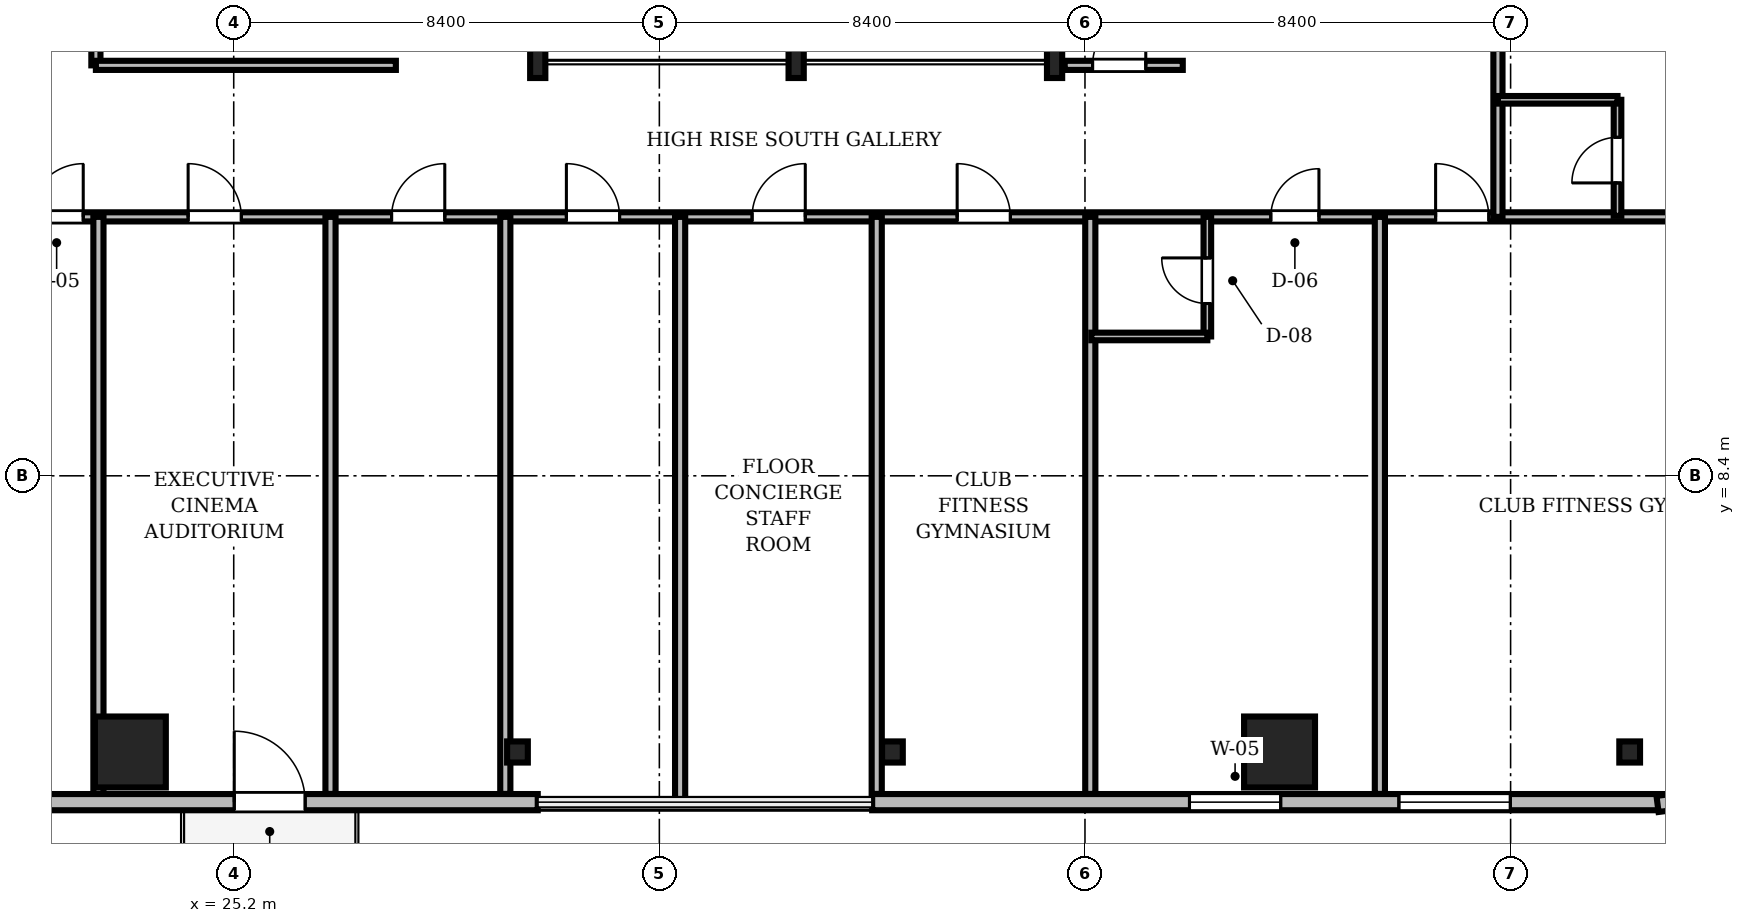
"""IFC4 building model, lengths in metres.
Left out: names, types, materials, properties, quantities, classifications, styles, units other than length and angle.
Written with IfcOpenShell. Run it as: python <this file> out.ifc"""

import sys

from ifc_helpers import new_model, si_unit, direction, frame, frame_2d, origin, origin_2d, place, context, subcontext, project, spatial, rectangle, i_section, extrude, source, transform, mapped, element, fill, save


model = new_model("IFC4")
c1 = context("Model", 3, precision=1e-05, world=origin(), true_north=direction((0.0, 1.0)))
c2 = subcontext(c1, "Body", "Model", "MODEL_VIEW")
j1 = project(units=[si_unit("LENGTHUNIT", "METRE"), si_unit("PLANEANGLEUNIT", "RADIAN")], contexts=[c1])
p1 = place(None, origin())
s1 = spatial("IfcSite", under=j1, at=p1, CompositionType="ELEMENT")
p2 = place(p1, origin())
s2 = spatial("IfcBuilding", under=s1, at=p2, CompositionType="ELEMENT")
p3 = place(p2, frame((0.0, 0.0, 184.8)))
s3 = spatial("IfcBuildingStorey", under=s2, at=p3, CompositionType="ELEMENT", Elevation=184.8)
m1 = source(origin(), c2, "Body", "SweptSolid", [
    extrude(i_section(OverallWidth=0.3, OverallDepth=0.7, WebThickness=0.017, FlangeThickness=0.032, FilletRadius=0.027, at=origin_2d()), origin(), (0.0, 0.0, 1.0), 3.53),
])
for number, where, z_axis, x_axis in (
    (1, (31.2, 16.6, 0.0), (0.0, 0.0, 1.0), (1.0, 0.0, 0.0)),
    (2, (36.3, 16.6, 0.0), (0.0, 0.0, 1.0), (1.0, 0.0, 0.0)),
    (3, (41.4, 16.6, 0.0), (0.0, 0.0, 1.0), (1.0, 0.0, 0.0)),
):
    element("IfcColumn", number, at=place(p3, frame(where, z_axis=z_axis, x_axis=x_axis)), inside=s3, PredefinedType="COLUMN", context=c2, shape_type="MappedRepresentation", body=[
        mapped(m1, transform((0.0, 0.0, 0.0), scale=1.0)),
    ])
m2 = source(origin(), c2, "Body", "SweptSolid", [
    extrude(rectangle(XDim=1.4, YDim=1.4, at=origin_2d()), origin(), (0.0, 0.0, 1.0), 3.53),
])
for number, where, z_axis, x_axis in (
    (4, (23.16, 2.95, 0.0), (0.0, 0.0, 1.0), (1.0, 0.0, 0.0)),
    (5, (45.84, 2.95, 0.0), (0.0, 0.0, 1.0), (1.0, 0.0, 0.0)),
):
    element("IfcColumn", number, at=place(p3, frame(where, z_axis=z_axis, x_axis=x_axis)), inside=s3, PredefinedType="COLUMN", context=c2, shape_type="MappedRepresentation", body=[
        mapped(m2, transform((0.0, 0.0, 0.0), scale=1.0)),
    ])
m3 = source(origin(), c2, "Body", "SweptSolid", [
    extrude(i_section(OverallWidth=0.409, OverallDepth=0.417, WebThickness=0.021, FlangeThickness=0.033, FilletRadius=0.015, at=origin_2d()), origin(), (0.0, 0.0, 1.0), 3.53),
])
for number, where, z_axis, x_axis in (
    (6, (30.8, 2.95, 0.0), (0.0, 0.0, 1.0), (1.0, 0.0, 0.0)),
    (7, (38.2, 2.95, 0.0), (0.0, 0.0, 1.0), (1.0, 0.0, 0.0)),
    (8, (52.75, 2.95, 0.0), (0.0, 0.0, 1.0), (1.0, 0.0, 0.0)),
):
    element("IfcColumn", number, at=place(p3, frame(where, z_axis=z_axis, x_axis=x_axis)), inside=s3, PredefinedType="COLUMN", context=c2, shape_type="MappedRepresentation", body=[
        mapped(m3, transform((0.0, 0.0, 0.0), scale=1.0)),
    ])
m4 = source(origin(), c2, "Body", "SweptSolid", [
    extrude(rectangle(XDim=15.6, YDim=0.32, at=frame_2d((7.8, 0.0))), origin(), (0.0, 0.0, 1.0), 3.53),
])
p4 = place(p3, frame((15.6, 1.96, 0.0), z_axis=(0.0, 0.0, 1.0), x_axis=(1.0, 0.0, 0.0)))
e9 = element("IfcWall", 9, at=p4, inside=s3, PredefinedType="SOLIDWALL", context=c2, shape_type="MappedRepresentation", body=[
    mapped(m4, transform((0.0, 0.0, 0.0), scale=1.0)),
])
m5 = source(origin(), c2, "Body", "SweptSolid", [
    extrude(rectangle(XDim=1.4, YDim=2.3, at=frame_2d((0.7, 1.15))), frame((0.0, 0.17, 0.0), z_axis=(0.0, -1.0, 0.0), x_axis=(1.0, 0.0, 0.0)), (0.0, 0.0, 1.0), 0.34),
])
p5 = place(p4, frame((9.61, 0.0, 0.0)))
e10 = element("IfcOpeningElement", 10, at=p5, cuts=e9, PredefinedType="OPENING", context=c2, shape_type="MappedRepresentation", body=[
    mapped(m5, transform((0.0, 0.0, 0.0), scale=1.0)),
])
m6 = source(origin(), c2, "Body", "SweptSolid", [
    extrude(rectangle(XDim=2.2, YDim=2.4, at=frame_2d((1.1, 1.2))), frame((0.0, 0.17, 0.0), z_axis=(0.0, -1.0, 0.0), x_axis=(1.0, 0.0, 0.0)), (0.0, 0.0, 1.0), 0.34),
])
p6 = place(p4, frame((3.005, 0.0, 0.72)))
e11 = element("IfcOpeningElement", 11, at=p6, cuts=e9, PredefinedType="OPENING", context=c2, shape_type="MappedRepresentation", body=[
    mapped(m6, transform((0.0, 0.0, 0.0), scale=1.0)),
])
p7 = place(p3, frame((37.8, 1.96, 0.0), z_axis=(0.0, 0.0, 1.0), x_axis=(1.0, 0.0, 0.0)))
e12 = element("IfcWall", 12, at=p7, inside=s3, PredefinedType="SOLIDWALL", context=c2, shape_type="MappedRepresentation", body=[
    mapped(m4, transform((0.0, 0.0, 0.0), scale=1.0)),
])
p8 = place(p7, frame((10.395, 0.0, 0.72)))
e13 = element("IfcOpeningElement", 13, at=p8, cuts=e12, PredefinedType="OPENING", context=c2, shape_type="MappedRepresentation", body=[
    mapped(m6, transform((0.0, 0.0, 0.0), scale=1.0)),
])
m7 = source(origin(), c2, "Body", "SweptSolid", [
    extrude(rectangle(XDim=1.8, YDim=2.4, at=frame_2d((0.9, 1.2))), frame((0.0, 0.17, 0.0), z_axis=(0.0, -1.0, 0.0), x_axis=(1.0, 0.0, 0.0)), (0.0, 0.0, 1.0), 0.34),
])
p9 = place(p7, frame((6.262, 0.0, 0.72)))
e14 = element("IfcOpeningElement", 14, at=p9, cuts=e12, PredefinedType="OPENING", context=c2, shape_type="MappedRepresentation", body=[
    mapped(m7, transform((0.0, 0.0, 0.0), scale=1.0)),
])
m8 = source(origin(), c2, "Body", "SweptSolid", [
    extrude(rectangle(XDim=1.17, YDim=0.32, at=frame_2d((0.585, 0.0))), origin(), (0.0, 0.0, 1.0), 3.53),
])
p10 = place(p3, frame((53.3, 1.925, 0.0), z_axis=(0.0, 0.0, 1.0), x_axis=(0.991762485493, 0.128090485085, 0.0)))
e15 = element("IfcWall", 15, at=p10, inside=s3, PredefinedType="SOLIDWALL", context=c2, shape_type="MappedRepresentation", body=[
    mapped(m8, transform((0.0, 0.0, 0.0), scale=1.0)),
])
m9 = source(origin(), c2, "Body", "SweptSolid", [
    extrude(rectangle(XDim=46.156, YDim=0.18, at=frame_2d((23.078, 0.0))), origin(), (0.0, 0.0, 1.0), 2.772),
])
p11 = place(p3, frame((11.422, 13.51, 0.0), z_axis=(0.0, 0.0, 1.0), x_axis=(1.0, 0.0, 0.0)))
e16 = element("IfcWall", 16, at=p11, inside=s3, PredefinedType="PARTITIONING", context=c2, shape_type="MappedRepresentation", body=[
    mapped(m9, transform((0.0, 0.0, 0.0), scale=1.0)),
])
m10 = source(origin(), c2, "Body", "SweptSolid", [
    extrude(rectangle(XDim=1.05, YDim=2.2, at=frame_2d((0.525, 1.1))), frame((0.0, 0.1, 0.0), z_axis=(0.0, -1.0, 0.0), x_axis=(1.0, 0.0, 0.0)), (0.0, 0.0, 1.0), 0.2),
])
p12 = place(p11, frame((9.758, 0.0, 0.0)))
e17 = element("IfcOpeningElement", 17, at=p12, cuts=e16, PredefinedType="OPENING", context=c2, shape_type="MappedRepresentation", body=[
    mapped(m10, transform((0.0, 0.0, 0.0), scale=1.0)),
])
p13 = place(p11, frame((12.878, 0.0, 0.0)))
e18 = element("IfcOpeningElement", 18, at=p13, cuts=e16, PredefinedType="OPENING", context=c2, shape_type="MappedRepresentation", body=[
    mapped(m10, transform((0.0, 0.0, 0.0), scale=1.0)),
])
p14 = place(p11, frame((16.893, 0.0, 0.0)))
e19 = element("IfcOpeningElement", 19, at=p14, cuts=e16, PredefinedType="OPENING", context=c2, shape_type="MappedRepresentation", body=[
    mapped(m10, transform((0.0, 0.0, 0.0), scale=1.0)),
])
p15 = place(p11, frame((20.344, 0.0, 0.0)))
e20 = element("IfcOpeningElement", 20, at=p15, cuts=e16, PredefinedType="OPENING", context=c2, shape_type="MappedRepresentation", body=[
    mapped(m10, transform((0.0, 0.0, 0.0), scale=1.0)),
])
p16 = place(p11, frame((24.008, 0.0, 0.0)))
e21 = element("IfcOpeningElement", 21, at=p16, cuts=e16, PredefinedType="OPENING", context=c2, shape_type="MappedRepresentation", body=[
    mapped(m10, transform((0.0, 0.0, 0.0), scale=1.0)),
])
p17 = place(p11, frame((28.055, 0.0, 0.0)))
e22 = element("IfcOpeningElement", 22, at=p17, cuts=e16, PredefinedType="OPENING", context=c2, shape_type="MappedRepresentation", body=[
    mapped(m10, transform((0.0, 0.0, 0.0), scale=1.0)),
])
m11 = source(origin(), c2, "Body", "SweptSolid", [
    extrude(rectangle(XDim=0.95, YDim=2.15, at=frame_2d((0.475, 1.075))), frame((0.0, 0.1, 0.0), z_axis=(0.0, -1.0, 0.0), x_axis=(1.0, 0.0, 0.0)), (0.0, 0.0, 1.0), 0.2),
])
p18 = place(p11, frame((34.246, 0.0, 0.0)))
e23 = element("IfcOpeningElement", 23, at=p18, cuts=e16, PredefinedType="OPENING", context=c2, shape_type="MappedRepresentation", body=[
    mapped(m11, transform((0.0, 0.0, 0.0), scale=1.0)),
])
p19 = place(p11, frame((37.498, 0.0, 0.0)))
e24 = element("IfcOpeningElement", 24, at=p19, cuts=e16, PredefinedType="OPENING", context=c2, shape_type="MappedRepresentation", body=[
    mapped(m10, transform((0.0, 0.0, 0.0), scale=1.0)),
])
m12 = source(origin(), c2, "Body", "SweptSolid", [
    extrude(rectangle(XDim=27.59, YDim=0.18, at=frame_2d((13.795, 0.0))), origin(), (0.0, 0.0, 1.0), 2.972),
])
p20 = place(p3, frame((50.15, 13.51, 0.0), z_axis=(0.0, 0.0, 1.0), x_axis=(0.0, 1.0, 0.0)))
e25 = element("IfcWall", 25, at=p20, inside=s3, PredefinedType="PARTITIONING", context=c2, shape_type="MappedRepresentation", body=[
    mapped(m12, transform((0.0, 0.0, 0.0), scale=1.0)),
])
p21 = place(p20, frame((4.086, 0.0, 0.0)))
e26 = element("IfcOpeningElement", 26, at=p21, cuts=e25, PredefinedType="OPENING", context=c2, shape_type="MappedRepresentation", body=[
    mapped(m10, transform((0.0, 0.0, 0.0), scale=1.0)),
])
p22 = place(p20, frame((9.744, 0.0, 0.0)))
e27 = element("IfcOpeningElement", 27, at=p22, cuts=e25, PredefinedType="OPENING", context=c2, shape_type="MappedRepresentation", body=[
    mapped(m10, transform((0.0, 0.0, 0.0), scale=1.0)),
])
p23 = place(p20, frame((17.771, 0.0, 0.0)))
e28 = element("IfcOpeningElement", 28, at=p23, cuts=e25, PredefinedType="OPENING", context=c2, shape_type="MappedRepresentation", body=[
    mapped(m10, transform((0.0, 0.0, 0.0), scale=1.0)),
])
p24 = place(p20, frame((24.614, 0.0, 0.0)))
e29 = element("IfcOpeningElement", 29, at=p24, cuts=e25, PredefinedType="OPENING", context=c2, shape_type="MappedRepresentation", body=[
    mapped(m10, transform((0.0, 0.0, 0.0), scale=1.0)),
])
m13 = source(origin(), c2, "Body", "SweptSolid", [
    extrude(rectangle(XDim=3.55, YDim=0.18, at=frame_2d((1.775, 0.0))), origin(), (0.0, 0.0, 1.0), 2.972),
])
p25 = place(p3, frame((22.48, 16.5, 0.0), z_axis=(0.0, 0.0, 1.0), x_axis=(0.0, 1.0, 0.0)))
e30 = element("IfcWall", 30, at=p25, inside=s3, PredefinedType="PARTITIONING", context=c2, shape_type="MappedRepresentation", body=[
    mapped(m13, transform((0.0, 0.0, 0.0), scale=1.0)),
])
p26 = place(p25, frame((1.15, 0.0, 0.0)))
e31 = element("IfcOpeningElement", 31, at=p26, cuts=e30, PredefinedType="OPENING", context=c2, shape_type="MappedRepresentation", body=[
    mapped(m10, transform((0.0, 0.0, 0.0), scale=1.0)),
])
m14 = source(origin(), c2, "Body", "SweptSolid", [
    extrude(rectangle(XDim=2.36, YDim=0.15, at=frame_2d((1.18, 0.0))), origin(), (0.0, 0.0, 1.0), 3.192),
])
p27 = place(p3, frame((44.415, 11.15, 0.0), z_axis=(0.0, 0.0, 1.0), x_axis=(0.0, 1.0, 0.0)))
e32 = element("IfcWall", 32, at=p27, inside=s3, PredefinedType="PARTITIONING", context=c2, shape_type="MappedRepresentation", body=[
    mapped(m14, transform((0.0, 0.0, 0.0), scale=1.0)),
])
m15 = source(origin(), c2, "Body", "SweptSolid", [
    extrude(rectangle(XDim=0.9, YDim=2.1, at=frame_2d((0.45, 1.05))), frame((0.0, 0.085, 0.0), z_axis=(0.0, -1.0, 0.0), x_axis=(1.0, 0.0, 0.0)), (0.0, 0.0, 1.0), 0.17),
])
p28 = place(p27, frame((0.65, 0.0, 0.0)))
e33 = element("IfcOpeningElement", 33, at=p28, cuts=e32, PredefinedType="OPENING", context=c2, shape_type="MappedRepresentation", body=[
    mapped(m15, transform((0.0, 0.0, 0.0), scale=1.0)),
])
m16 = source(origin(), c2, "Body", "SweptSolid", [
    extrude(rectangle(XDim=2.33, YDim=0.18, at=frame_2d((1.165, 0.0))), origin(), (0.0, 0.0, 1.0), 2.972),
])
p29 = place(p3, frame((41.6, 16.5, 0.0), z_axis=(0.0, 0.0, 1.0), x_axis=(1.0, 0.0, 0.0)))
e34 = element("IfcWall", 34, at=p29, inside=s3, PredefinedType="PARTITIONING", context=c2, shape_type="MappedRepresentation", body=[
    mapped(m16, transform((0.0, 0.0, 0.0), scale=1.0)),
])
p30 = place(p29, frame((0.55, 0.0, 0.0)))
e35 = element("IfcOpeningElement", 35, at=p30, cuts=e34, PredefinedType="OPENING", context=c2, shape_type="MappedRepresentation", body=[
    mapped(m10, transform((0.0, 0.0, 0.0), scale=1.0)),
])
m17 = source(origin(), c2, "Body", "SweptSolid", [
    extrude(rectangle(XDim=2.29, YDim=0.15, at=frame_2d((1.145, 0.0))), origin(), (0.0, 0.0, 1.0), 2.972),
])
p31 = place(p3, frame((52.51, 13.53, 0.0), z_axis=(0.0, 0.0, 1.0), x_axis=(0.0, 1.0, 0.0)))
e36 = element("IfcWall", 36, at=p31, inside=s3, PredefinedType="PARTITIONING", context=c2, shape_type="MappedRepresentation", body=[
    mapped(m17, transform((0.0, 0.0, 0.0), scale=1.0)),
])
p32 = place(p31, frame((0.65, 0.0, 0.0)))
e37 = element("IfcOpeningElement", 37, at=p32, cuts=e36, PredefinedType="OPENING", context=c2, shape_type="MappedRepresentation", body=[
    mapped(m15, transform((0.0, 0.0, 0.0), scale=1.0)),
])
m18 = source(origin(), c2, "Body", "SweptSolid", [
    extrude(rectangle(XDim=11.388, YDim=0.2, at=frame_2d((5.694, 0.0))), origin(), (0.0, 0.0, 1.0), 2.772),
])
for number, where, z_axis, x_axis in (
    (38, (22.53, 2.122, 0.0), (0.0, 0.0, 1.0), (0.0, 1.0, 0.0)),
    (39, (27.11, 2.122, 0.0), (0.0, 0.0, 1.0), (0.0, 1.0, 0.0)),
    (40, (30.56, 2.122, 0.0), (0.0, 0.0, 1.0), (0.0, 1.0, 0.0)),
):
    element("IfcWall", number, at=place(p3, frame(where, z_axis=z_axis, x_axis=x_axis)), inside=s3, PredefinedType="PARTITIONING", context=c2, shape_type="MappedRepresentation", body=[
        mapped(m18, transform((0.0, 0.0, 0.0), scale=1.0)),
    ])
m19 = source(origin(), c2, "Body", "SweptSolid", [
    extrude(rectangle(XDim=11.58, YDim=0.2, at=frame_2d((5.79, 0.0))), origin(), (0.0, 0.0, 1.0), 2.772),
])
p33 = place(p3, frame((34.01, 1.93, 0.0), z_axis=(0.0, 0.0, 1.0), x_axis=(0.0, 1.0, 0.0)))
e41 = element("IfcWall", 41, at=p33, inside=s3, PredefinedType="PARTITIONING", context=c2, shape_type="MappedRepresentation", body=[
    mapped(m19, transform((0.0, 0.0, 0.0), scale=1.0)),
])
for number, where, z_axis, x_axis in (
    (42, (37.89, 2.122, 0.0), (0.0, 0.0, 1.0), (0.0, 1.0, 0.0)),
    (43, (42.105, 2.122, 0.0), (0.0, 0.0, 1.0), (0.0, 1.0, 0.0)),
    (44, (47.82, 2.122, 0.0), (0.0, 0.0, 1.0), (0.0, 1.0, 0.0)),
):
    element("IfcWall", number, at=place(p3, frame(where, z_axis=z_axis, x_axis=x_axis)), inside=s3, PredefinedType="PARTITIONING", context=c2, shape_type="MappedRepresentation", body=[
        mapped(m18, transform((0.0, 0.0, 0.0), scale=1.0)),
    ])
m20 = source(origin(), c2, "Body", "SweptSolid", [
    extrude(rectangle(XDim=5.92, YDim=0.18, at=frame_2d((2.96, 0.0))), origin(), (0.0, 0.0, 1.0), 3.53),
])
p34 = place(p3, frame((22.48, 16.5, 0.0), z_axis=(0.0, 0.0, 1.0), x_axis=(1.0, 0.0, 0.0)))
e45 = element("IfcWall", 45, at=p34, inside=s3, PredefinedType="PARTITIONING", context=c2, shape_type="MappedRepresentation", body=[
    mapped(m20, transform((0.0, 0.0, 0.0), scale=1.0)),
])
m21 = source(origin(), c2, "Body", "SweptSolid", [
    extrude(rectangle(XDim=2.36, YDim=0.15, at=frame_2d((1.18, 0.0))), origin(), (0.0, 0.0, 1.0), 3.53),
])
p35 = place(p3, frame((50.15, 15.82, 0.0), z_axis=(0.0, 0.0, 1.0), x_axis=(1.0, 0.0, 0.0)))
e46 = element("IfcWall", 46, at=p35, inside=s3, PredefinedType="PARTITIONING", context=c2, shape_type="MappedRepresentation", body=[
    mapped(m21, transform((0.0, 0.0, 0.0), scale=1.0)),
])
p36 = place(p3, frame((42.125, 11.15, 0.0), z_axis=(0.0, 0.0, 1.0), x_axis=(1.0, 0.0, 0.0)))
e47 = element("IfcWall", 47, at=p36, inside=s3, PredefinedType="PARTITIONING", context=c2, shape_type="MappedRepresentation", body=[
    mapped(m17, transform((0.0, 0.0, 0.0), scale=1.0)),
])
m22 = source(origin(), c2, "Body", "SweptSolid", [
    extrude(rectangle(XDim=1.4, YDim=2.3, at=frame_2d((0.7, 1.15))), frame((0.0, 0.025, 0.0), z_axis=(0.0, -1.0, 0.0), x_axis=(1.0, 0.0, 0.0)), (0.0, 0.0, 1.0), 0.05),
])
p37 = place(p5, frame((1.4, 0.0, 0.0), z_axis=(0.0, 0.0, 1.0), x_axis=(-1.0, 0.0, 0.0)))
e48 = element("IfcDoor", 48, at=p37, inside=s3, OperationType="DOUBLE_DOOR_SLIDING", PredefinedType="DOOR", context=c2, shape_type="MappedRepresentation", body=[
    mapped(m22, transform((0.0, 0.0, 0.0), scale=1.0)),
])
fill(e10, e48)
m23 = source(origin(), c2, "Body", "SweptSolid", [
    extrude(rectangle(XDim=2.2, YDim=2.4, at=frame_2d((1.1, 1.2))), frame((0.0, 0.03, 0.0), z_axis=(0.0, -1.0, 0.0), x_axis=(1.0, 0.0, 0.0)), (0.0, 0.0, 1.0), 0.06),
])
p38 = place(p8, origin())
e49 = element("IfcWindow", 49, at=p38, inside=s3, PartitioningType="SINGLE_PANEL", PredefinedType="WINDOW", context=c2, shape_type="MappedRepresentation", body=[
    mapped(m23, transform((0.0, 0.0, 0.0), scale=1.0)),
])
fill(e13, e49)
m24 = source(origin(), c2, "Body", "SweptSolid", [
    extrude(rectangle(XDim=1.8, YDim=2.4, at=frame_2d((0.9, 1.2))), frame((0.0, 0.03, 0.0), z_axis=(0.0, -1.0, 0.0), x_axis=(1.0, 0.0, 0.0)), (0.0, 0.0, 1.0), 0.06),
])
p39 = place(p9, origin())
e50 = element("IfcWindow", 50, at=p39, inside=s3, PartitioningType="SINGLE_PANEL", PredefinedType="WINDOW", context=c2, shape_type="MappedRepresentation", body=[
    mapped(m24, transform((0.0, 0.0, 0.0), scale=1.0)),
])
fill(e14, e50)
m25 = source(origin(), c2, "Body", "SweptSolid", [
    extrude(rectangle(XDim=1.05, YDim=2.2, at=frame_2d((0.525, 1.1))), frame((0.0, 0.025, 0.0), z_axis=(0.0, -1.0, 0.0), x_axis=(1.0, 0.0, 0.0)), (0.0, 0.0, 1.0), 0.05),
])
p40 = place(p12, origin())
e51 = element("IfcDoor", 51, at=p40, inside=s3, OperationType="SINGLE_SWING_RIGHT", PredefinedType="DOOR", context=c2, shape_type="MappedRepresentation", body=[
    mapped(m25, transform((0.0, 0.0, 0.0), scale=1.0)),
])
fill(e17, e51)
p41 = place(p13, origin())
e52 = element("IfcDoor", 52, at=p41, inside=s3, OperationType="SINGLE_SWING_LEFT", PredefinedType="DOOR", context=c2, shape_type="MappedRepresentation", body=[
    mapped(m25, transform((0.0, 0.0, 0.0), scale=1.0)),
])
fill(e18, e52)
p42 = place(p14, origin())
e53 = element("IfcDoor", 53, at=p42, inside=s3, OperationType="SINGLE_SWING_RIGHT", PredefinedType="DOOR", context=c2, shape_type="MappedRepresentation", body=[
    mapped(m25, transform((0.0, 0.0, 0.0), scale=1.0)),
])
fill(e19, e53)
p43 = place(p15, origin())
e54 = element("IfcDoor", 54, at=p43, inside=s3, OperationType="SINGLE_SWING_LEFT", PredefinedType="DOOR", context=c2, shape_type="MappedRepresentation", body=[
    mapped(m25, transform((0.0, 0.0, 0.0), scale=1.0)),
])
fill(e20, e54)
p44 = place(p16, origin())
e55 = element("IfcDoor", 55, at=p44, inside=s3, OperationType="SINGLE_SWING_RIGHT", PredefinedType="DOOR", context=c2, shape_type="MappedRepresentation", body=[
    mapped(m25, transform((0.0, 0.0, 0.0), scale=1.0)),
])
fill(e21, e55)
p45 = place(p17, origin())
e56 = element("IfcDoor", 56, at=p45, inside=s3, OperationType="SINGLE_SWING_LEFT", PredefinedType="DOOR", context=c2, shape_type="MappedRepresentation", body=[
    mapped(m25, transform((0.0, 0.0, 0.0), scale=1.0)),
])
fill(e22, e56)
m26 = source(origin(), c2, "Body", "SweptSolid", [
    extrude(rectangle(XDim=0.95, YDim=2.15, at=frame_2d((0.475, 1.075))), frame((0.0, 0.025, 0.0), z_axis=(0.0, -1.0, 0.0), x_axis=(1.0, 0.0, 0.0)), (0.0, 0.0, 1.0), 0.05),
])
p46 = place(p18, origin())
e57 = element("IfcDoor", 57, at=p46, inside=s3, OperationType="SINGLE_SWING_RIGHT", PredefinedType="DOOR", context=c2, shape_type="MappedRepresentation", body=[
    mapped(m26, transform((0.0, 0.0, 0.0), scale=1.0)),
])
fill(e23, e57)
p47 = place(p19, origin())
e58 = element("IfcDoor", 58, at=p47, inside=s3, OperationType="SINGLE_SWING_LEFT", PredefinedType="DOOR", context=c2, shape_type="MappedRepresentation", body=[
    mapped(m25, transform((0.0, 0.0, 0.0), scale=1.0)),
])
fill(e24, e58)
m27 = source(origin(), c2, "Body", "SweptSolid", [
    extrude(rectangle(XDim=0.9, YDim=2.1, at=frame_2d((0.45, 1.05))), frame((0.0, 0.025, 0.0), z_axis=(0.0, -1.0, 0.0), x_axis=(1.0, 0.0, 0.0)), (0.0, 0.0, 1.0), 0.05),
])
p48 = place(p28, origin())
e59 = element("IfcDoor", 59, at=p48, inside=s3, OperationType="SINGLE_SWING_RIGHT", PredefinedType="DOOR", context=c2, shape_type="MappedRepresentation", body=[
    mapped(m27, transform((0.0, 0.0, 0.0), scale=1.0)),
])
fill(e33, e59)
p49 = place(p30, origin())
e60 = element("IfcDoor", 60, at=p49, inside=s3, OperationType="SINGLE_SWING_RIGHT", PredefinedType="DOOR", context=c2, shape_type="MappedRepresentation", body=[
    mapped(m25, transform((0.0, 0.0, 0.0), scale=1.0)),
])
fill(e35, e60)
p50 = place(p32, origin())
e61 = element("IfcDoor", 61, at=p50, inside=s3, OperationType="SINGLE_SWING_LEFT", PredefinedType="DOOR", context=c2, shape_type="MappedRepresentation", body=[
    mapped(m27, transform((0.0, 0.0, 0.0), scale=1.0)),
])
fill(e37, e61)
save(model, sys.argv[1])
